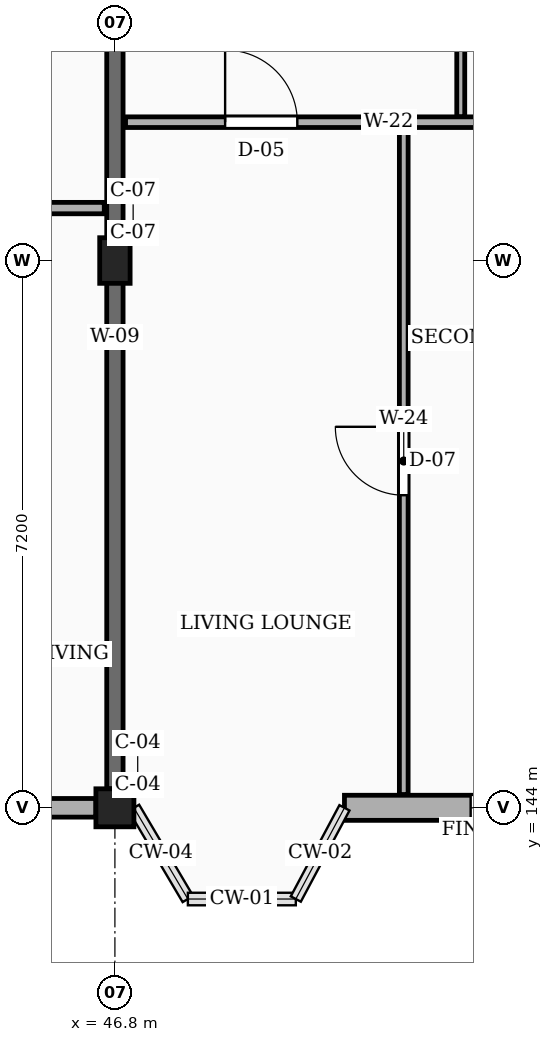
"""IFC4 building model, lengths in metres.
Left out: names, types, materials, properties, quantities, classifications, styles, units other than length and angle.
Written with IfcOpenShell. Run it as: python <this file> out.ifc"""

import sys

from ifc_helpers import new_model, si_unit, direction, frame, frame_2d, origin, origin_2d, place, context, subcontext, project, spatial, rectangle, extrude, element, fill, save


model = new_model("IFC4")
c1 = context("Model", 3, precision=1e-05, world=origin(), true_north=direction((0.0, 1.0)))
c2 = subcontext(c1, "Body", "Model", "MODEL_VIEW")
j1 = project(units=[si_unit("LENGTHUNIT", "METRE"), si_unit("PLANEANGLEUNIT", "RADIAN")], contexts=[c1])
p1 = place(None, origin())
s1 = spatial("IfcSite", under=j1, at=p1, CompositionType="ELEMENT")
p2 = place(p1, origin())
s2 = spatial("IfcBuilding", under=s1, at=p2, CompositionType="ELEMENT")
p3 = place(p2, frame((0.0, 0.0, 29.7)))
s3 = spatial("IfcBuildingStorey", under=s2, at=p3, CompositionType="ELEMENT", Elevation=29.7)
p4 = place(p3, frame((46.8, 144.0, 0.0), z_axis=(0.0, 0.0, 1.0), x_axis=(1.0, 0.0, 0.0)))
e1 = element("IfcColumn", 1, at=p4, inside=s3, PredefinedType="COLUMN", context=c2, shape_type="SweptSolid", body=[
    extrude(rectangle(XDim=0.5, YDim=0.5, at=origin_2d()), origin(), (0.0, 0.0, 1.0), 3.15),
])
p5 = place(p3, frame((46.8, 151.2, 0.0), z_axis=(0.0, 0.0, 1.0), x_axis=(1.0, 0.0, 0.0)))
e2 = element("IfcColumn", 2, at=p5, inside=s3, PredefinedType="COLUMN", context=c2, shape_type="SweptSolid", body=[
    extrude(rectangle(XDim=0.4, YDim=0.6, at=origin_2d()), origin(), (0.0, 0.0, 1.0), 3.15),
])
p6 = place(p3, frame((46.8, 144.25, 0.0), z_axis=(0.0, 0.0, 1.0), x_axis=(0.0, 1.0, 0.0)))
e3 = element("IfcWall", 3, at=p6, inside=s3, PredefinedType="SOLIDWALL", context=c2, shape_type="SweptSolid", body=[
    extrude(rectangle(XDim=11.9, YDim=0.215, at=frame_2d((5.95, 0.0))), origin(), (0.0, 0.0, 1.0), 2.185),
])
p7 = place(p3, frame((39.85, 144.0, 0.0), z_axis=(0.0, 0.0, 1.0), x_axis=(1.0, 0.0, 0.0)))
e4 = element("IfcWall", 4, at=p7, inside=s3, PredefinedType="SOLIDWALL", context=c2, shape_type="SweptSolid", body=[
    extrude(rectangle(XDim=6.7, YDim=0.245, at=frame_2d((3.35, 0.0))), origin(), (0.0, 0.0, 1.0), 2.455),
])
p8 = place(p7, frame((0.45, 0.0, 0.78)))
e5 = element("IfcOpeningElement", 5, at=p8, cuts=e4, PredefinedType="OPENING", context=c2, shape_type="SweptSolid", body=[
    extrude(rectangle(XDim=1.12, YDim=1.26, at=frame_2d((0.56, 0.63))), frame((0.0, 0.133, 0.0), z_axis=(0.0, -1.0, 0.0), x_axis=(1.0, 0.0, 0.0)), (0.0, 0.0, 1.0), 0.265),
])
p9 = place(p7, frame((4.65, 0.0, 0.78)))
e6 = element("IfcOpeningElement", 6, at=p9, cuts=e4, PredefinedType="OPENING", context=c2, shape_type="SweptSolid", body=[
    extrude(rectangle(XDim=1.28, YDim=1.26, at=frame_2d((0.64, 0.63))), frame((0.0, 0.133, 0.0), z_axis=(0.0, -1.0, 0.0), x_axis=(1.0, 0.0, 0.0)), (0.0, 0.0, 1.0), 0.265),
])
p10 = place(p3, frame((49.82, 144.0, 0.0), z_axis=(0.0, 0.0, 1.0), x_axis=(1.0, 0.0, 0.0)))
e7 = element("IfcWall", 7, at=p10, inside=s3, PredefinedType="SOLIDWALL", context=c2, shape_type="SweptSolid", body=[
    extrude(rectangle(XDim=3.93, YDim=0.33, at=frame_2d((1.965, 0.0))), origin(), (0.0, 0.0, 1.0), 2.455),
])
p11 = place(p10, frame((1.66, 0.0, 0.78)))
e8 = element("IfcOpeningElement", 8, at=p11, cuts=e7, PredefinedType="OPENING", context=c2, shape_type="SweptSolid", body=[
    extrude(rectangle(XDim=1.28, YDim=1.26, at=frame_2d((0.64, 0.63))), frame((0.0, 0.175, 0.0), z_axis=(0.0, -1.0, 0.0), x_axis=(1.0, 0.0, 0.0)), (0.0, 0.0, 1.0), 0.35),
])
p12 = place(p3, frame((39.74, 151.89, 0.0), z_axis=(0.0, 0.0, 1.0), x_axis=(1.0, 0.0, 0.0)))
e9 = element("IfcWall", 9, at=p12, inside=s3, PredefinedType="PARTITIONING", context=c2, shape_type="SweptSolid", body=[
    extrude(rectangle(XDim=6.92, YDim=0.15, at=frame_2d((3.46, 0.0))), origin(), (0.0, 0.0, 1.0), 2.32),
])
p13 = place(p12, frame((4.66, 0.0, 0.0)))
e10 = element("IfcOpeningElement", 10, at=p13, cuts=e9, PredefinedType="OPENING", context=c2, shape_type="SweptSolid", body=[
    extrude(rectangle(XDim=0.92, YDim=2.1, at=frame_2d((0.46, 1.05))), frame((0.0, 0.085, 0.0), z_axis=(0.0, -1.0, 0.0), x_axis=(1.0, 0.0, 0.0)), (0.0, 0.0, 1.0), 0.17),
])
p14 = place(p3, frame((50.6, 144.175, 0.0), z_axis=(0.0, 0.0, 1.0), x_axis=(0.0, 1.0, 0.0)))
e11 = element("IfcWall", 11, at=p14, inside=s3, PredefinedType="PARTITIONING", context=c2, shape_type="SweptSolid", body=[
    extrude(rectangle(XDim=8.775, YDim=0.115, at=frame_2d((4.387, 0.0))), origin(), (0.0, 0.0, 1.0), 2.32),
])
p15 = place(p14, frame((3.938, 0.0, 0.0)))
e12 = element("IfcOpeningElement", 12, at=p15, cuts=e11, PredefinedType="OPENING", context=c2, shape_type="SweptSolid", body=[
    extrude(rectangle(XDim=0.9, YDim=2.1, at=frame_2d((0.45, 1.05))), frame((0.0, 0.067, 0.0), z_axis=(0.0, -1.0, 0.0), x_axis=(1.0, 0.0, 0.0)), (0.0, 0.0, 1.0), 0.135),
])
p16 = place(p3, frame((51.35, 153.09, 0.0), z_axis=(0.0, 0.0, 1.0), x_axis=(0.0, 1.0, 0.0)))
e13 = element("IfcWall", 13, at=p16, inside=s3, PredefinedType="PARTITIONING", context=c2, shape_type="SweptSolid", body=[
    extrude(rectangle(XDim=3.12, YDim=0.105, at=frame_2d((1.56, 0.0))), origin(), (0.0, 0.0, 1.0), 2.32),
])
p17 = place(p16, frame((1.11, 0.0, 0.0)))
e14 = element("IfcOpeningElement", 14, at=p17, cuts=e13, PredefinedType="OPENING", context=c2, shape_type="SweptSolid", body=[
    extrude(rectangle(XDim=0.9, YDim=2.05, at=frame_2d((0.45, 1.025))), frame((0.0, 0.062, 0.0), z_axis=(0.0, -1.0, 0.0), x_axis=(1.0, 0.0, 0.0)), (0.0, 0.0, 1.0), 0.125),
])
p18 = place(p3, frame((46.94, 153.02, 0.0), z_axis=(0.0, 0.0, 1.0), x_axis=(1.0, 0.0, 0.0)))
e15 = element("IfcWall", 15, at=p18, inside=s3, PredefinedType="PARTITIONING", context=c2, shape_type="SweptSolid", body=[
    extrude(rectangle(XDim=6.92, YDim=0.14, at=frame_2d((3.46, 0.0))), origin(), (0.0, 0.0, 1.0), 2.32),
])
p19 = place(p18, frame((1.31, 0.0, 0.0)))
e16 = element("IfcOpeningElement", 16, at=p19, cuts=e15, PredefinedType="OPENING", context=c2, shape_type="SweptSolid", body=[
    extrude(rectangle(XDim=0.95, YDim=2.1, at=frame_2d((0.475, 1.05))), frame((0.0, 0.08, 0.0), z_axis=(0.0, -1.0, 0.0), x_axis=(1.0, 0.0, 0.0)), (0.0, 0.0, 1.0), 0.16),
])
p20 = place(p11, origin())
e17 = element("IfcWindow", 17, at=p20, inside=s3, PartitioningType="SINGLE_PANEL", PredefinedType="WINDOW", context=c2, shape_type="SweptSolid", body=[
    extrude(rectangle(XDim=1.28, YDim=1.26, at=frame_2d((0.64, 0.63))), frame((0.0, 0.03, 0.0), z_axis=(0.0, -1.0, 0.0), x_axis=(1.0, 0.0, 0.0)), (0.0, 0.0, 1.0), 0.06),
])
fill(e8, e17)
p21 = place(p15, origin())
e18 = element("IfcDoor", 18, at=p21, inside=s3, OperationType="SINGLE_SWING_RIGHT", PredefinedType="DOOR", context=c2, shape_type="SweptSolid", body=[
    extrude(rectangle(XDim=0.9, YDim=2.1, at=frame_2d((0.45, 1.05))), frame((0.0, 0.025, 0.0), z_axis=(0.0, -1.0, 0.0), x_axis=(1.0, 0.0, 0.0)), (0.0, 0.0, 1.0), 0.05),
])
fill(e12, e18)
p22 = place(p19, origin())
e19 = element("IfcDoor", 19, at=p22, inside=s3, OperationType="SINGLE_SWING_LEFT", PredefinedType="DOOR", context=c2, shape_type="SweptSolid", body=[
    extrude(rectangle(XDim=0.95, YDim=2.1, at=frame_2d((0.475, 1.05))), frame((0.0, 0.025, 0.0), z_axis=(0.0, -1.0, 0.0), x_axis=(1.0, 0.0, 0.0)), (0.0, 0.0, 1.0), 0.05),
])
fill(e16, e19)
save(model, sys.argv[1])
